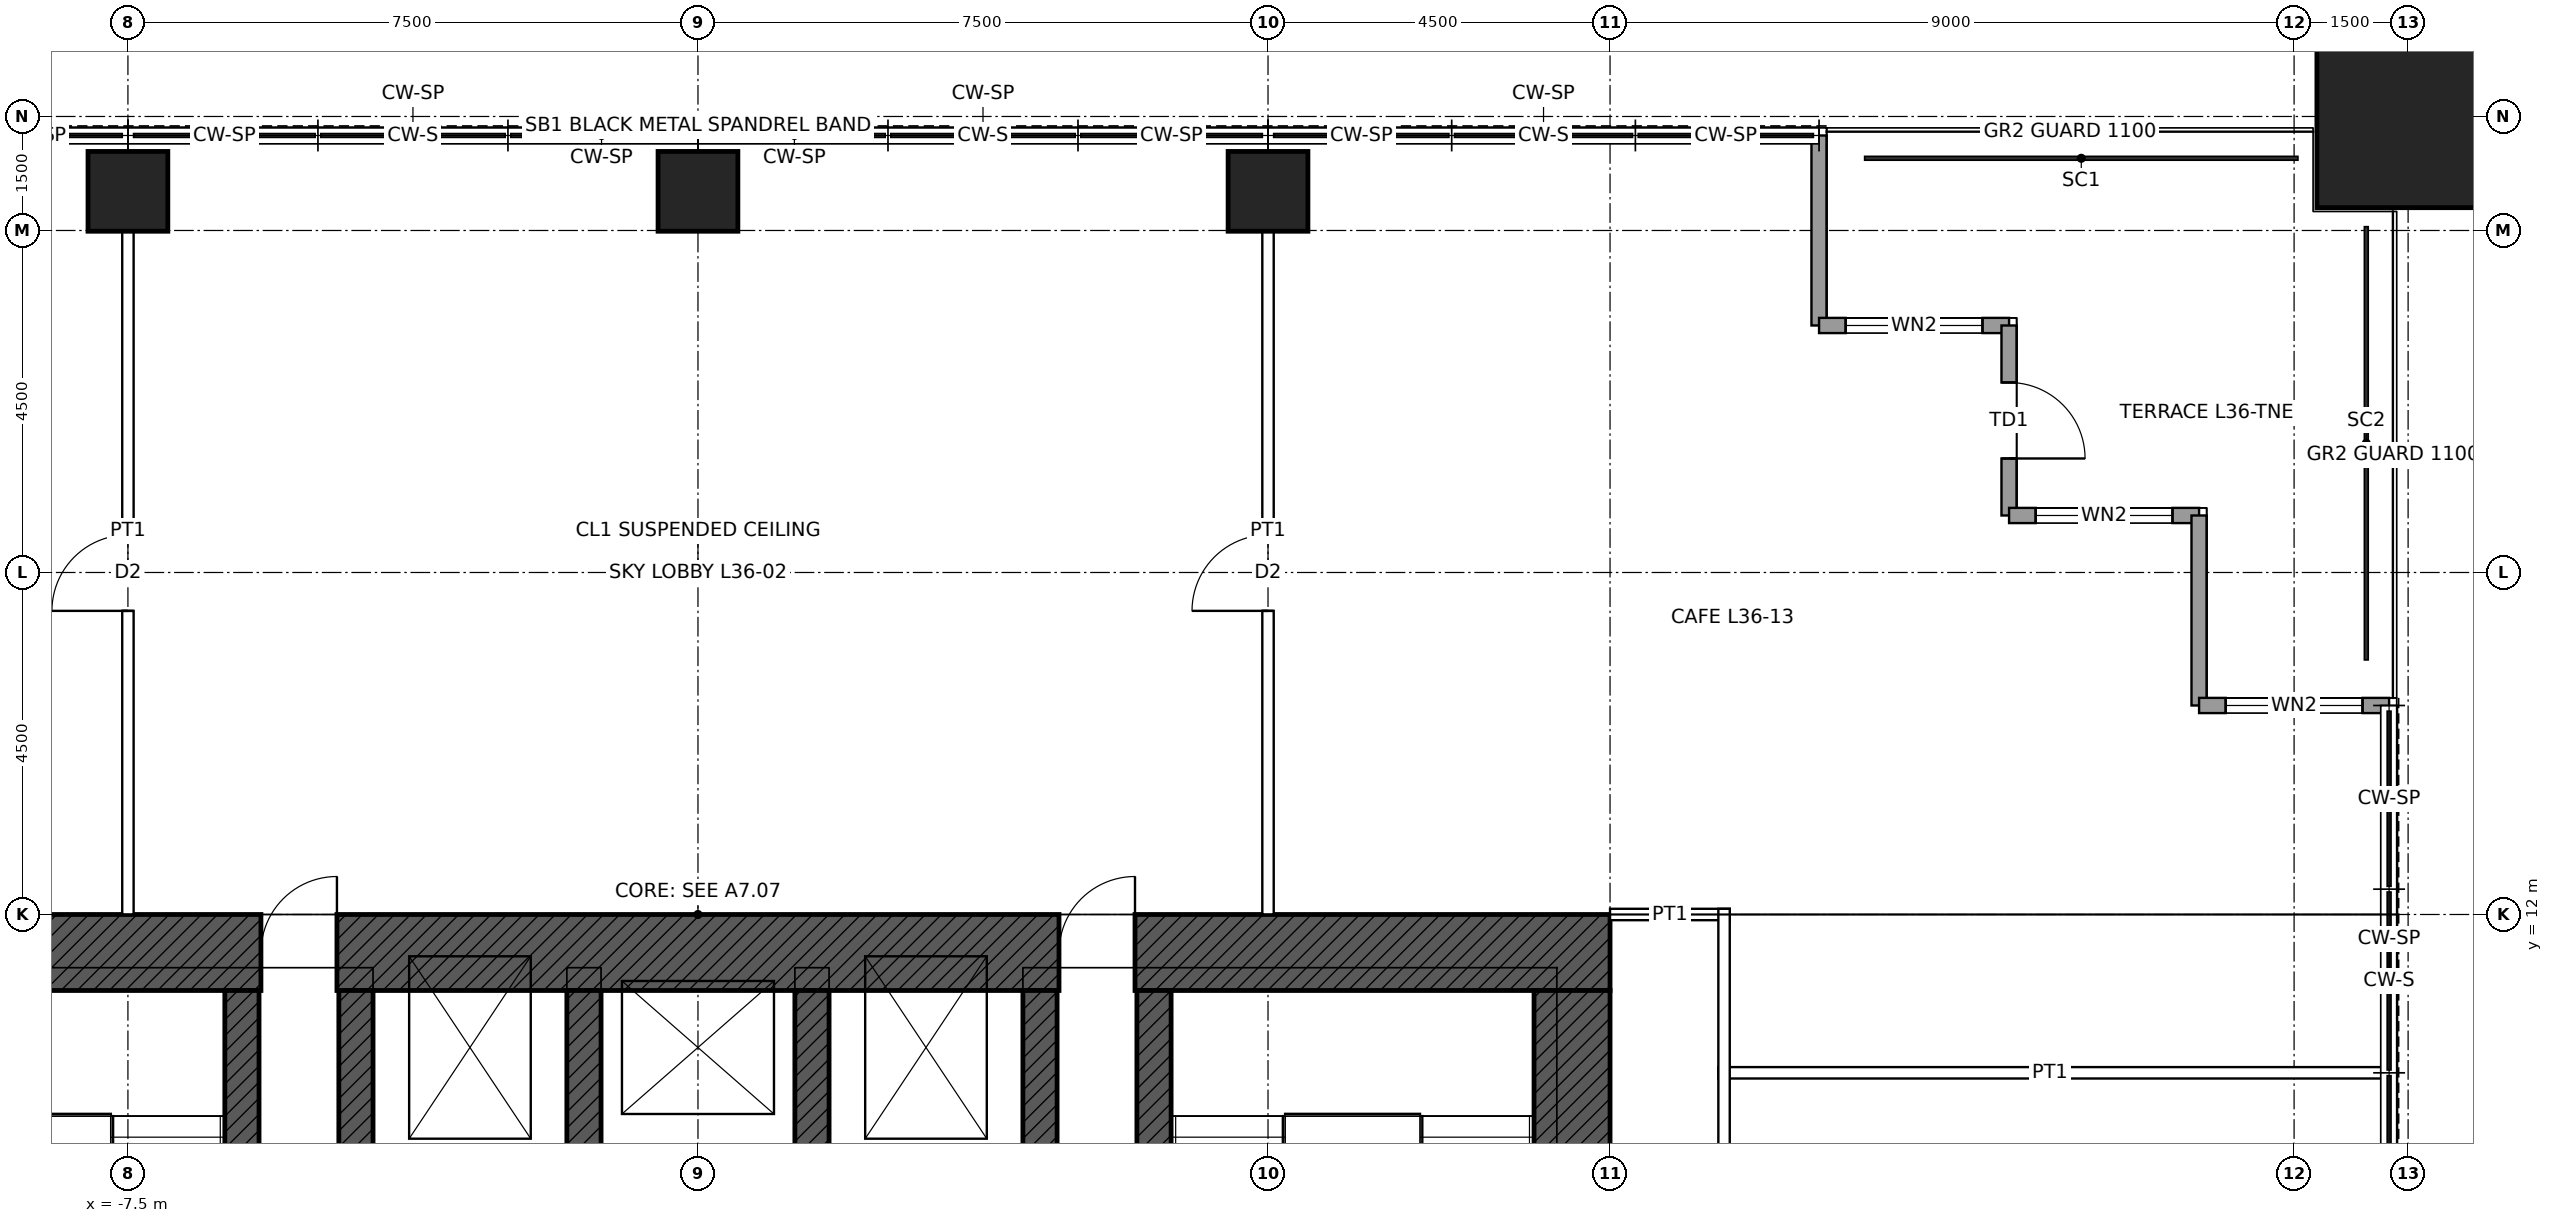
"""IFC4 building model, lengths in metres.
Left out: names, types, materials, properties, quantities, classifications, styles, units other than length and angle.
Written with IfcOpenShell. Run it as: python <this file> out.ifc"""

import sys

from ifc_helpers import new_model, si_unit, direction, frame, frame_2d, origin, origin_2d, place, context, subcontext, project, spatial, rectangle, hollow_rectangle, extrude, element, fill, save


model = new_model("IFC4")
c1 = context("Model", 3, precision=1e-05, world=origin(), true_north=direction((0.0, 1.0)))
c2 = subcontext(c1, "Body", "Model", "MODEL_VIEW")
j1 = project(units=[si_unit("LENGTHUNIT", "METRE"), si_unit("PLANEANGLEUNIT", "RADIAN")], contexts=[c1])
p1 = place(None, origin())
s1 = spatial("IfcSite", under=j1, at=p1, CompositionType="ELEMENT")
p2 = place(p1, origin())
s2 = spatial("IfcBuilding", under=s1, at=p2, CompositionType="ELEMENT")
p3 = place(p2, frame((0.0, 0.0, 177.9)))
s3 = spatial("IfcBuildingStorey", under=s2, at=p3, CompositionType="ELEMENT", Elevation=177.9)
p4 = place(p3, frame((22.5, 22.5, 0.0), z_axis=(0.0, 0.0, 1.0), x_axis=(1.0, 0.0, 0.0)))
e1 = element("IfcColumn", 1, at=p4, inside=s3, PredefinedType="COLUMN", context=c2, shape_type="SweptSolid", body=[
    extrude(hollow_rectangle(XDim=2.4, YDim=2.4, WallThickness=0.12, at=origin_2d()), origin(), (0.0, 0.0, 1.0), 4.0),
])
p5 = place(p3, frame((-7.5, 21.515, 0.0), z_axis=(0.0, 0.0, 1.0), x_axis=(1.0, 0.0, 0.0)))
e2 = element("IfcColumn", 2, at=p5, inside=s3, PredefinedType="COLUMN", context=c2, shape_type="SweptSolid", body=[
    extrude(hollow_rectangle(XDim=1.05, YDim=1.05, WallThickness=0.075, at=origin_2d()), origin(), (0.0, 0.0, 1.0), 4.0),
])
p6 = place(p3, frame((0.0, 21.515, 0.0), z_axis=(0.0, 0.0, 1.0), x_axis=(1.0, 0.0, 0.0)))
e3 = element("IfcColumn", 3, at=p6, inside=s3, PredefinedType="COLUMN", context=c2, shape_type="SweptSolid", body=[
    extrude(hollow_rectangle(XDim=1.05, YDim=1.05, WallThickness=0.07, at=origin_2d()), origin(), (0.0, 0.0, 1.0), 4.0),
])
p7 = place(p3, frame((7.5, 21.515, 0.0), z_axis=(0.0, 0.0, 1.0), x_axis=(1.0, 0.0, 0.0)))
e4 = element("IfcColumn", 4, at=p7, inside=s3, PredefinedType="COLUMN", context=c2, shape_type="SweptSolid", body=[
    extrude(hollow_rectangle(XDim=1.05, YDim=1.05, WallThickness=0.075, at=origin_2d()), origin(), (0.0, 0.0, 1.0), 4.0),
])
p8 = place(p3, frame((-12.0, 11.5, 0.0), z_axis=(0.0, 0.0, 1.0), x_axis=(1.0, 0.0, 0.0)))
e5 = element("IfcWall", 5, at=p8, inside=s3, PredefinedType="SHEAR", context=c2, shape_type="SweptSolid", body=[
    extrude(rectangle(XDim=24.0, YDim=1.0, at=frame_2d((12.0, 0.0))), origin(), (0.0, 0.0, 1.0), 4.0),
])
p9 = place(p8, frame((6.25, 0.0, 0.0)))
e6 = element("IfcOpeningElement", 6, at=p9, cuts=e5, PredefinedType="OPENING", context=c2, shape_type="SweptSolid", body=[
    extrude(rectangle(XDim=1.0, YDim=2.4, at=frame_2d((0.5, 1.2))), frame((0.0, 0.51, 0.0), z_axis=(0.0, -1.0, 0.0), x_axis=(1.0, 0.0, 0.0)), (0.0, 0.0, 1.0), 1.02),
])
p10 = place(p8, frame((16.75, 0.0, 0.0)))
e7 = element("IfcOpeningElement", 7, at=p10, cuts=e5, PredefinedType="OPENING", context=c2, shape_type="SweptSolid", body=[
    extrude(rectangle(XDim=1.0, YDim=2.4, at=frame_2d((0.5, 1.2))), frame((0.0, 0.51, 0.0), z_axis=(0.0, -1.0, 0.0), x_axis=(1.0, 0.0, 0.0)), (0.0, 0.0, 1.0), 1.02),
])
p11 = place(p3, frame((11.5, 11.0, 0.0), z_axis=(0.0, 0.0, 1.0), x_axis=(0.0, -1.0, 0.0)))
e8 = element("IfcWall", 8, at=p11, inside=s3, PredefinedType="SHEAR", context=c2, shape_type="SweptSolid", body=[
    extrude(rectangle(XDim=22.0, YDim=1.0, at=frame_2d((11.0, 0.0))), origin(), (0.0, 0.0, 1.0), 4.0),
])
p12 = place(p11, frame((10.5, 0.0, 0.0)))
e9 = element("IfcOpeningElement", 9, at=p12, cuts=e8, PredefinedType="OPENING", context=c2, shape_type="SweptSolid", body=[
    extrude(rectangle(XDim=1.0, YDim=2.4, at=frame_2d((0.5, 1.2))), frame((0.0, 0.51, 0.0), z_axis=(0.0, -1.0, 0.0), x_axis=(1.0, 0.0, 0.0)), (0.0, 0.0, 1.0), 1.02),
])
p13 = place(p3, frame((-6.0, 4.5, 0.0), z_axis=(0.0, 0.0, 1.0), x_axis=(0.0, 1.0, 0.0)))
e10 = element("IfcWall", 10, at=p13, inside=s3, PredefinedType="SHEAR", context=c2, shape_type="SweptSolid", body=[
    extrude(rectangle(XDim=6.5, YDim=0.45, at=frame_2d((3.25, 0.0))), origin(), (0.0, 0.0, 1.0), 4.0),
])
p14 = place(p13, frame((0.6, 0.0, 0.0)))
e11 = element("IfcOpeningElement", 11, at=p14, cuts=e10, PredefinedType="OPENING", context=c2, shape_type="SweptSolid", body=[
    extrude(rectangle(XDim=1.0, YDim=2.1, at=frame_2d((0.5, 1.05))), frame((0.0, 0.235, 0.0), z_axis=(0.0, -1.0, 0.0), x_axis=(1.0, 0.0, 0.0)), (0.0, 0.0, 1.0), 0.47),
])
p15 = place(p3, frame((6.0, 4.5, 0.0), z_axis=(0.0, 0.0, 1.0), x_axis=(0.0, 1.0, 0.0)))
e12 = element("IfcWall", 12, at=p15, inside=s3, PredefinedType="SHEAR", context=c2, shape_type="SweptSolid", body=[
    extrude(rectangle(XDim=6.5, YDim=0.45, at=frame_2d((3.25, 0.0))), origin(), (0.0, 0.0, 1.0), 4.0),
])
p16 = place(p15, frame((0.6, 0.0, 0.0)))
e13 = element("IfcOpeningElement", 13, at=p16, cuts=e12, PredefinedType="OPENING", context=c2, shape_type="SweptSolid", body=[
    extrude(rectangle(XDim=1.0, YDim=2.1, at=frame_2d((0.5, 1.05))), frame((0.0, 0.235, 0.0), z_axis=(0.0, -1.0, 0.0), x_axis=(1.0, 0.0, 0.0)), (0.0, 0.0, 1.0), 0.47),
])
for number, where, z_axis, x_axis in (
    (14, (-4.5, 8.5, 0.0), (0.0, 0.0, 1.0), (0.0, 1.0, 0.0)),
    (15, (4.5, 8.5, 0.0), (0.0, 0.0, 1.0), (0.0, 1.0, 0.0)),
    (16, (-1.5, 8.5, 0.0), (0.0, 0.0, 1.0), (0.0, 1.0, 0.0)),
    (17, (1.5, 8.5, 0.0), (0.0, 0.0, 1.0), (0.0, 1.0, 0.0)),
):
    element("IfcWall", number, at=place(p3, frame(where, z_axis=z_axis, x_axis=x_axis)), inside=s3, PredefinedType="SHEAR", context=c2, shape_type="SweptSolid", body=[
        extrude(rectangle(XDim=2.5, YDim=0.45, at=frame_2d((1.25, 0.0))), origin(), (0.0, 0.0, 1.0), 4.0),
    ])
p17 = place(p3, frame((14.75, 22.25, 0.0), z_axis=(0.0, 0.0, 1.0), x_axis=(0.0, -1.0, 0.0)))
e18 = element("IfcWall", 18, at=p17, inside=s3, PredefinedType="SOLIDWALL", context=c2, shape_type="SweptSolid", body=[
    extrude(rectangle(XDim=2.5, YDim=0.2, at=frame_2d((1.25, 0.0))), origin(), (0.0, 0.0, 1.0), 3.85),
])
p18 = place(p3, frame((14.75, 19.75, 0.0), z_axis=(0.0, 0.0, 1.0), x_axis=(1.0, 0.0, 0.0)))
e19 = element("IfcWall", 19, at=p18, inside=s3, PredefinedType="SOLIDWALL", context=c2, shape_type="SweptSolid", body=[
    extrude(rectangle(XDim=2.5, YDim=0.2, at=frame_2d((1.25, 0.0))), origin(), (0.0, 0.0, 1.0), 3.85),
])
p19 = place(p18, frame((0.35, 0.0, 0.3)))
e20 = element("IfcOpeningElement", 20, at=p19, cuts=e19, PredefinedType="OPENING", context=c2, shape_type="SweptSolid", body=[
    extrude(rectangle(XDim=1.8, YDim=2.4, at=frame_2d((0.9, 1.2))), frame((0.0, 0.11, 0.0), z_axis=(0.0, -1.0, 0.0), x_axis=(1.0, 0.0, 0.0)), (0.0, 0.0, 1.0), 0.22),
])
p20 = place(p3, frame((17.25, 19.75, 0.0), z_axis=(0.0, 0.0, 1.0), x_axis=(0.0, -1.0, 0.0)))
e21 = element("IfcWall", 21, at=p20, inside=s3, PredefinedType="SOLIDWALL", context=c2, shape_type="SweptSolid", body=[
    extrude(rectangle(XDim=2.5, YDim=0.2, at=frame_2d((1.25, 0.0))), origin(), (0.0, 0.0, 1.0), 3.85),
])
p21 = place(p20, frame((0.75, 0.0, 0.0)))
e22 = element("IfcOpeningElement", 22, at=p21, cuts=e21, PredefinedType="OPENING", context=c2, shape_type="SweptSolid", body=[
    extrude(rectangle(XDim=1.0, YDim=2.4, at=frame_2d((0.5, 1.2))), frame((0.0, 0.11, 0.0), z_axis=(0.0, -1.0, 0.0), x_axis=(1.0, 0.0, 0.0)), (0.0, 0.0, 1.0), 0.22),
])
p22 = place(p3, frame((17.25, 17.25, 0.0), z_axis=(0.0, 0.0, 1.0), x_axis=(1.0, 0.0, 0.0)))
e23 = element("IfcWall", 23, at=p22, inside=s3, PredefinedType="SOLIDWALL", context=c2, shape_type="SweptSolid", body=[
    extrude(rectangle(XDim=2.5, YDim=0.2, at=frame_2d((1.25, 0.0))), origin(), (0.0, 0.0, 1.0), 3.85),
])
p23 = place(p22, frame((0.35, 0.0, 0.3)))
e24 = element("IfcOpeningElement", 24, at=p23, cuts=e23, PredefinedType="OPENING", context=c2, shape_type="SweptSolid", body=[
    extrude(rectangle(XDim=1.8, YDim=2.4, at=frame_2d((0.9, 1.2))), frame((0.0, 0.11, 0.0), z_axis=(0.0, -1.0, 0.0), x_axis=(1.0, 0.0, 0.0)), (0.0, 0.0, 1.0), 0.22),
])
p24 = place(p3, frame((19.75, 17.25, 0.0), z_axis=(0.0, 0.0, 1.0), x_axis=(0.0, -1.0, 0.0)))
e25 = element("IfcWall", 25, at=p24, inside=s3, PredefinedType="SOLIDWALL", context=c2, shape_type="SweptSolid", body=[
    extrude(rectangle(XDim=2.5, YDim=0.2, at=frame_2d((1.25, 0.0))), origin(), (0.0, 0.0, 1.0), 3.85),
])
p25 = place(p3, frame((19.75, 14.75, 0.0), z_axis=(0.0, 0.0, 1.0), x_axis=(1.0, 0.0, 0.0)))
e26 = element("IfcWall", 26, at=p25, inside=s3, PredefinedType="SOLIDWALL", context=c2, shape_type="SweptSolid", body=[
    extrude(rectangle(XDim=2.5, YDim=0.2, at=frame_2d((1.25, 0.0))), origin(), (0.0, 0.0, 1.0), 3.85),
])
p26 = place(p25, frame((0.35, 0.0, 0.3)))
e27 = element("IfcOpeningElement", 27, at=p26, cuts=e26, PredefinedType="OPENING", context=c2, shape_type="SweptSolid", body=[
    extrude(rectangle(XDim=1.8, YDim=2.4, at=frame_2d((0.9, 1.2))), frame((0.0, 0.11, 0.0), z_axis=(0.0, -1.0, 0.0), x_axis=(1.0, 0.0, 0.0)), (0.0, 0.0, 1.0), 0.22),
])
p27 = place(p3, frame((13.425, 9.917, 0.0), z_axis=(0.0, 0.0, 1.0), x_axis=(1.0, 0.0, 0.0)))
e28 = element("IfcWall", 28, at=p27, inside=s3, PredefinedType="PARTITIONING", context=c2, shape_type="SweptSolid", body=[
    extrude(rectangle(XDim=8.725, YDim=0.15, at=frame_2d((4.362, 0.0))), origin(), (0.0, 0.0, 1.0), 3.85),
])
p28 = place(p3, frame((12.0, 12.0, 0.0), z_axis=(0.0, 0.0, 1.0), x_axis=(1.0, 0.0, 0.0)))
e29 = element("IfcWall", 29, at=p28, inside=s3, PredefinedType="PARTITIONING", context=c2, shape_type="SweptSolid", body=[
    extrude(rectangle(XDim=1.575, YDim=0.15, at=frame_2d((0.788, 0.0))), origin(), (0.0, 0.0, 1.0), 2.908),
])
p29 = place(p3, frame((-7.5, 12.0, 0.0), z_axis=(0.0, 0.0, 1.0), x_axis=(0.0, 1.0, 0.0)))
e30 = element("IfcWall", 30, at=p29, inside=s3, PredefinedType="PARTITIONING", context=c2, shape_type="SweptSolid", body=[
    extrude(rectangle(XDim=8.99, YDim=0.15, at=frame_2d((4.495, 0.0))), origin(), (0.0, 0.0, 1.0), 3.238),
])
p30 = place(p29, frame((3.995, 0.0, 0.0)))
e31 = element("IfcOpeningElement", 31, at=p30, cuts=e30, PredefinedType="OPENING", context=c2, shape_type="SweptSolid", body=[
    extrude(rectangle(XDim=1.0, YDim=2.1, at=frame_2d((0.5, 1.05))), frame((0.0, 0.085, 0.0), z_axis=(0.0, -1.0, 0.0), x_axis=(1.0, 0.0, 0.0)), (0.0, 0.0, 1.0), 0.17),
])
p31 = place(p3, frame((7.5, 12.0, 0.0), z_axis=(0.0, 0.0, 1.0), x_axis=(0.0, 1.0, 0.0)))
e32 = element("IfcWall", 32, at=p31, inside=s3, PredefinedType="PARTITIONING", context=c2, shape_type="SweptSolid", body=[
    extrude(rectangle(XDim=8.99, YDim=0.15, at=frame_2d((4.495, 0.0))), origin(), (0.0, 0.0, 1.0), 3.238),
])
p32 = place(p31, frame((3.995, 0.0, 0.0)))
e33 = element("IfcOpeningElement", 33, at=p32, cuts=e32, PredefinedType="OPENING", context=c2, shape_type="SweptSolid", body=[
    extrude(rectangle(XDim=1.0, YDim=2.1, at=frame_2d((0.5, 1.05))), frame((0.0, 0.085, 0.0), z_axis=(0.0, -1.0, 0.0), x_axis=(1.0, 0.0, 0.0)), (0.0, 0.0, 1.0), 0.17),
])
p33 = place(p3, frame((13.5, -13.575, 0.0), z_axis=(0.0, 0.0, 1.0), x_axis=(0.0, 1.0, 0.0)))
e34 = element("IfcWall", 34, at=p33, inside=s3, PredefinedType="PARTITIONING", context=c2, shape_type="SweptSolid", body=[
    extrude(rectangle(XDim=25.65, YDim=0.15, at=frame_2d((12.825, 0.0))), origin(), (0.0, 0.0, 1.0), 3.85),
])
p34 = place(p33, frame((15.533, 0.0, 0.0)))
e35 = element("IfcOpeningElement", 35, at=p34, cuts=e34, PredefinedType="OPENING", context=c2, shape_type="SweptSolid", body=[
    extrude(rectangle(XDim=1.0, YDim=2.1, at=frame_2d((0.5, 1.05))), frame((0.0, 0.085, 0.0), z_axis=(0.0, -1.0, 0.0), x_axis=(1.0, 0.0, 0.0)), (0.0, 0.0, 1.0), 0.17),
])
p35 = place(p33, frame((5.616, 0.0, 0.0)))
e36 = element("IfcOpeningElement", 36, at=p35, cuts=e34, PredefinedType="OPENING", context=c2, shape_type="SweptSolid", body=[
    extrude(rectangle(XDim=1.0, YDim=2.1, at=frame_2d((0.5, 1.05))), frame((0.0, 0.085, 0.0), z_axis=(0.0, -1.0, 0.0), x_axis=(1.0, 0.0, 0.0)), (0.0, 0.0, 1.0), 0.17),
])
p36 = place(p19, origin())
e37 = element("IfcWindow", 37, at=p36, inside=s3, PartitioningType="SINGLE_PANEL", PredefinedType="WINDOW", context=c2, shape_type="SweptSolid", body=[
    extrude(rectangle(XDim=1.8, YDim=2.4, at=frame_2d((0.9, 1.2))), frame((0.0, 0.03, 0.0), z_axis=(0.0, -1.0, 0.0), x_axis=(1.0, 0.0, 0.0)), (0.0, 0.0, 1.0), 0.06),
])
fill(e20, e37)
p37 = place(p21, origin())
e38 = element("IfcDoor", 38, at=p37, inside=s3, OperationType="SINGLE_SWING_RIGHT", PredefinedType="DOOR", context=c2, shape_type="SweptSolid", body=[
    extrude(rectangle(XDim=1.0, YDim=2.4, at=frame_2d((0.5, 1.2))), frame((0.0, 0.025, 0.0), z_axis=(0.0, -1.0, 0.0), x_axis=(1.0, 0.0, 0.0)), (0.0, 0.0, 1.0), 0.05),
])
fill(e22, e38)
p38 = place(p23, origin())
e39 = element("IfcWindow", 39, at=p38, inside=s3, PartitioningType="SINGLE_PANEL", PredefinedType="WINDOW", context=c2, shape_type="SweptSolid", body=[
    extrude(rectangle(XDim=1.8, YDim=2.4, at=frame_2d((0.9, 1.2))), frame((0.0, 0.03, 0.0), z_axis=(0.0, -1.0, 0.0), x_axis=(1.0, 0.0, 0.0)), (0.0, 0.0, 1.0), 0.06),
])
fill(e24, e39)
p39 = place(p26, origin())
e40 = element("IfcWindow", 40, at=p39, inside=s3, PartitioningType="SINGLE_PANEL", PredefinedType="WINDOW", context=c2, shape_type="SweptSolid", body=[
    extrude(rectangle(XDim=1.8, YDim=2.4, at=frame_2d((0.9, 1.2))), frame((0.0, 0.03, 0.0), z_axis=(0.0, -1.0, 0.0), x_axis=(1.0, 0.0, 0.0)), (0.0, 0.0, 1.0), 0.06),
])
fill(e27, e40)
p40 = place(p9, origin())
e41 = element("IfcDoor", 41, at=p40, inside=s3, OperationType="SINGLE_SWING_RIGHT", PredefinedType="DOOR", context=c2, shape_type="SweptSolid", body=[
    extrude(rectangle(XDim=1.0, YDim=2.4, at=frame_2d((0.5, 1.2))), frame((0.0, 0.485, 0.0), z_axis=(0.0, -1.0, 0.0), x_axis=(1.0, 0.0, 0.0)), (0.0, 0.0, 1.0), 0.05),
])
fill(e6, e41)
p41 = place(p10, origin())
e42 = element("IfcDoor", 42, at=p41, inside=s3, OperationType="SINGLE_SWING_RIGHT", PredefinedType="DOOR", context=c2, shape_type="SweptSolid", body=[
    extrude(rectangle(XDim=1.0, YDim=2.4, at=frame_2d((0.5, 1.2))), frame((0.0, 0.485, 0.0), z_axis=(0.0, -1.0, 0.0), x_axis=(1.0, 0.0, 0.0)), (0.0, 0.0, 1.0), 0.05),
])
fill(e7, e42)
p42 = place(p30, origin())
e43 = element("IfcDoor", 43, at=p42, inside=s3, OperationType="SINGLE_SWING_LEFT", PredefinedType="DOOR", context=c2, shape_type="SweptSolid", body=[
    extrude(rectangle(XDim=1.0, YDim=2.1, at=frame_2d((0.5, 1.05))), frame((0.0, 0.025, 0.0), z_axis=(0.0, -1.0, 0.0), x_axis=(1.0, 0.0, 0.0)), (0.0, 0.0, 1.0), 0.05),
])
fill(e31, e43)
p43 = place(p32, origin())
e44 = element("IfcDoor", 44, at=p43, inside=s3, OperationType="SINGLE_SWING_LEFT", PredefinedType="DOOR", context=c2, shape_type="SweptSolid", body=[
    extrude(rectangle(XDim=1.0, YDim=2.1, at=frame_2d((0.5, 1.05))), frame((0.0, 0.025, 0.0), z_axis=(0.0, -1.0, 0.0), x_axis=(1.0, 0.0, 0.0)), (0.0, 0.0, 1.0), 0.05),
])
fill(e33, e44)
save(model, sys.argv[1])
